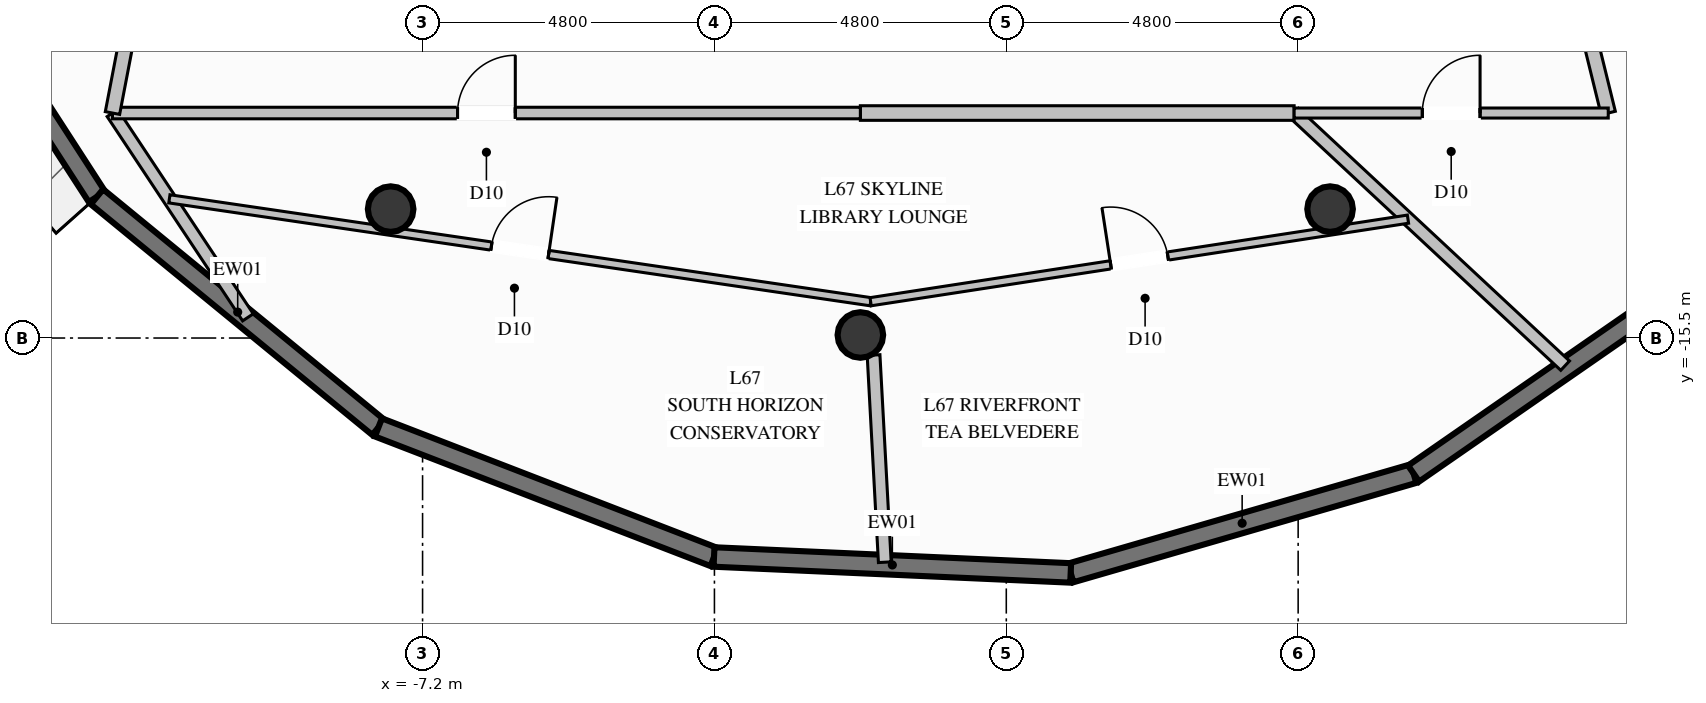
"""IFC4 building model, lengths in metres.
Left out: names, types, materials, properties, quantities, classifications, styles, units other than length and angle.
Written with IfcOpenShell. Run it as: python <this file> out.ifc"""

import sys

from ifc_helpers import new_model, si_unit, direction, frame, frame_2d, origin, origin_2d, place, context, subcontext, project, spatial, rectangle, circle, extrude, element, fill, save


model = new_model("IFC4")
c1 = context("Model", 3, precision=1e-05, world=origin(), true_north=direction((0.0, 1.0)))
c2 = subcontext(c1, "Body", "Model", "MODEL_VIEW")
j1 = project(units=[si_unit("LENGTHUNIT", "METRE"), si_unit("PLANEANGLEUNIT", "RADIAN")], contexts=[c1])
p1 = place(None, origin())
s1 = spatial("IfcSite", under=j1, at=p1, CompositionType="ELEMENT")
p2 = place(p1, origin())
s2 = spatial("IfcBuilding", under=s1, at=p2, CompositionType="ELEMENT")
p3 = place(p2, frame((0.0, 0.0, 258.2)))
s3 = spatial("IfcBuildingStorey", under=s2, at=p3, CompositionType="ELEMENT", Elevation=258.2)
for number, where, z_axis, x_axis in (
    (1, (-7.725, -13.38, 0.0), (0.0, 0.0, 1.0), (1.0, 0.0, 0.0)),
    (2, (0.0, -15.45, 0.0), (0.0, 0.0, 1.0), (1.0, 0.0, 0.0)),
    (3, (7.725, -13.38, 0.0), (0.0, 0.0, 1.0), (1.0, 0.0, 0.0)),
):
    element("IfcColumn", number, at=place(p3, frame(where, z_axis=z_axis, x_axis=x_axis)), inside=s3, PredefinedType="COLUMN", context=c2, shape_type="SweptSolid", body=[
        extrude(circle(Radius=0.375, at=origin_2d()), origin(), (0.0, 0.0, 1.0), 3.8),
    ])
p4 = place(p3, frame((9.099, -17.729, 0.0), z_axis=(0.0, 0.0, 1.0), x_axis=(-0.960502287474, -0.278272089432, 0.0)))
e4 = element("IfcWall", 4, at=p4, inside=s3, PredefinedType="SOLIDWALL", context=c2, shape_type="SweptSolid", body=[
    extrude(rectangle(XDim=5.872, YDim=0.32, at=frame_2d((2.936, 0.0))), origin(), (0.0, 0.0, 1.0), 3.57),
])
p5 = place(p3, frame((13.961, -14.36, 0.0), z_axis=(0.0, 0.0, 1.0), x_axis=(-0.821952888389, -0.569555483925, 0.0)))
e5 = element("IfcWall", 5, at=p5, inside=s3, PredefinedType="SOLIDWALL", context=c2, shape_type="SweptSolid", body=[
    extrude(rectangle(XDim=5.915, YDim=0.32, at=frame_2d((2.958, 0.0))), origin(), (0.0, 0.0, 1.0), 3.57),
])
p6 = place(p3, frame((-12.555, -13.177, 0.0), z_axis=(0.0, 0.0, 1.0), x_axis=(-0.543217830049, 0.839591799101, 0.0)))
e6 = element("IfcWall", 6, at=p6, inside=s3, PredefinedType="SOLIDWALL", context=c2, shape_type="SweptSolid", body=[
    extrude(rectangle(XDim=6.053, YDim=0.32, at=frame_2d((3.026, 0.0))), origin(), (0.0, 0.0, 1.0), 3.57),
])
p7 = place(p3, frame((-7.926, -16.97, 0.0), z_axis=(0.0, 0.0, 1.0), x_axis=(-0.773491773729, 0.633806339486, 0.0)))
e7 = element("IfcWall", 7, at=p7, inside=s3, PredefinedType="SOLIDWALL", context=c2, shape_type="SweptSolid", body=[
    extrude(rectangle(XDim=5.984, YDim=0.32, at=frame_2d((2.992, 0.0))), origin(), (0.0, 0.0, 1.0), 3.57),
])
p8 = place(p3, frame((-2.407, -19.101, 0.0), z_axis=(0.0, 0.0, 1.0), x_axis=(-0.932869372668, 0.360214843582, 0.0)))
e8 = element("IfcWall", 8, at=p8, inside=s3, PredefinedType="SOLIDWALL", context=c2, shape_type="SweptSolid", body=[
    extrude(rectangle(XDim=5.916, YDim=0.32, at=frame_2d((2.958, 0.0))), origin(), (0.0, 0.0, 1.0), 3.57),
])
p9 = place(p3, frame((3.459, -19.363, 0.0), z_axis=(0.0, 0.0, 1.0), x_axis=(-0.999004316421, 0.044613627649, 0.0)))
e9 = element("IfcWall", 9, at=p9, inside=s3, PredefinedType="SOLIDWALL", context=c2, shape_type="SweptSolid", body=[
    extrude(rectangle(XDim=5.872, YDim=0.32, at=frame_2d((2.936, 0.0))), origin(), (0.0, 0.0, 1.0), 3.57),
])
p10 = place(p3, frame((7.134, -11.8, 0.0), z_axis=(0.0, 0.0, 1.0), x_axis=(0.731533464102, -0.681805537451, 0.0)))
e10 = element("IfcWall", 10, at=p10, inside=s3, PredefinedType="PARTITIONING", context=c2, shape_type="SweptSolid", body=[
    extrude(rectangle(XDim=6.093, YDim=0.21, at=frame_2d((3.046, 0.0))), origin(), (0.0, 0.0, 1.0), 2.449),
])
p11 = place(p3, frame((-12.3, -11.8, 0.0), z_axis=(0.0, 0.0, 1.0), x_axis=(0.552658168023, -0.833408032909, 0.0)))
e11 = element("IfcWall", 11, at=p11, inside=s3, PredefinedType="PARTITIONING", context=c2, shape_type="SweptSolid", body=[
    extrude(rectangle(XDim=4.031, YDim=0.21, at=frame_2d((2.016, 0.0))), origin(), (0.0, 0.0, 1.0), 3.57),
])
p12 = place(p3, frame((0.0, -11.8, 0.0), z_axis=(0.0, 0.0, 1.0), x_axis=(1.0, 0.0, 0.0)))
e12 = element("IfcWall", 12, at=p12, inside=s3, PredefinedType="PARTITIONING", context=c2, shape_type="SweptSolid", body=[
    extrude(rectangle(XDim=7.134, YDim=0.24, at=frame_2d((3.567, 0.0))), origin(), (0.0, 0.0, 1.0), 3.57),
])
p13 = place(p3, frame((-12.3, -11.8, 0.0), z_axis=(0.0, 0.0, 1.0), x_axis=(1.0, 0.0, 0.0)))
e13 = element("IfcWall", 13, at=p13, inside=s3, PredefinedType="PARTITIONING", context=c2, shape_type="SweptSolid", body=[
    extrude(rectangle(XDim=12.3, YDim=0.19, at=frame_2d((6.15, 0.0))), origin(), (0.0, 0.0, 1.0), 3.57),
])
p14 = place(p13, frame((5.675, 0.0, 0.0)))
e14 = element("IfcOpeningElement", 14, at=p14, cuts=e13, PredefinedType="OPENING", context=c2, shape_type="SweptSolid", body=[
    extrude(rectangle(XDim=0.95, YDim=2.1, at=frame_2d((0.475, 1.05))), frame((0.0, 0.105, 0.0), z_axis=(0.0, -1.0, 0.0), x_axis=(1.0, 0.0, 0.0)), (0.0, 0.0, 1.0), 0.21),
])
p15 = place(p3, frame((-11.235, -6.25, 0.0), z_axis=(0.0, 0.0, 1.0), x_axis=(-0.18844199237, -0.982084321997, 0.0)))
e15 = element("IfcWall", 15, at=p15, inside=s3, PredefinedType="PARTITIONING", context=c2, shape_type="SweptSolid", body=[
    extrude(rectangle(XDim=5.651, YDim=0.24, at=frame_2d((2.826, 0.0))), origin(), (0.0, 0.0, 1.0), 3.57),
])
p16 = place(p15, frame((2.326, 0.0, 0.0)))
e16 = element("IfcOpeningElement", 16, at=p16, cuts=e15, PredefinedType="OPENING", context=c2, shape_type="SweptSolid", body=[
    extrude(rectangle(XDim=1.0, YDim=2.2, at=frame_2d((0.5, 1.1))), frame((0.0, 0.13, 0.0), z_axis=(0.0, -1.0, 0.0), x_axis=(1.0, 0.0, 0.0)), (0.0, 0.0, 1.0), 0.26),
])
p17 = place(p3, frame((0.217, -15.78, 0.0), z_axis=(0.0, 0.0, 1.0), x_axis=(0.054237497116, -0.998528063655, 0.0)))
e17 = element("IfcWall", 17, at=p17, inside=s3, PredefinedType="PARTITIONING", context=c2, shape_type="SweptSolid", body=[
    extrude(rectangle(XDim=3.412, YDim=0.21, at=frame_2d((1.706, 0.0))), origin(), (0.0, 0.0, 1.0), 2.449),
])
p18 = place(p3, frame((-11.364, -13.211, 0.0), z_axis=(0.0, 0.0, 1.0), x_axis=(0.989407054011, -0.145167770091, 0.0)))
e18 = element("IfcWall", 18, at=p18, inside=s3, PredefinedType="PARTITIONING", context=c2, shape_type="SweptSolid", body=[
    extrude(rectangle(XDim=11.656, YDim=0.135, at=frame_2d((5.828, 0.0))), origin(), (0.0, 0.0, 1.0), 3.137),
])
p19 = place(p18, frame((5.353, 0.0, 0.0)))
e19 = element("IfcOpeningElement", 19, at=p19, cuts=e18, PredefinedType="OPENING", context=c2, shape_type="SweptSolid", body=[
    extrude(rectangle(XDim=0.95, YDim=2.1, at=frame_2d((0.475, 1.05))), frame((0.0, 0.078, 0.0), z_axis=(0.0, -1.0, 0.0), x_axis=(1.0, 0.0, 0.0)), (0.0, 0.0, 1.0), 0.155),
])
p20 = place(p3, frame((0.169, -14.903, 0.0), z_axis=(0.0, 0.0, 1.0), x_axis=(0.988395361394, 0.151903290202, 0.0)))
e20 = element("IfcWall", 20, at=p20, inside=s3, PredefinedType="PARTITIONING", context=c2, shape_type="SweptSolid", body=[
    extrude(rectangle(XDim=8.941, YDim=0.135, at=frame_2d((4.47, 0.0))), origin(), (0.0, 0.0, 1.0), 3.137),
])
p21 = place(p20, frame((3.995, 0.0, 0.0)))
e21 = element("IfcOpeningElement", 21, at=p21, cuts=e20, PredefinedType="OPENING", context=c2, shape_type="SweptSolid", body=[
    extrude(rectangle(XDim=0.95, YDim=2.1, at=frame_2d((0.475, 1.05))), frame((0.0, 0.078, 0.0), z_axis=(0.0, -1.0, 0.0), x_axis=(1.0, 0.0, 0.0)), (0.0, 0.0, 1.0), 0.155),
])
p22 = place(p3, frame((12.3, -11.8, 0.0), z_axis=(0.0, 0.0, 1.0), x_axis=(-0.238825099749, 0.971062599285, 0.0)))
e22 = element("IfcWall", 22, at=p22, inside=s3, PredefinedType="PARTITIONING", context=c2, shape_type="SweptSolid", body=[
    extrude(rectangle(XDim=5.715, YDim=0.24, at=frame_2d((2.858, 0.0))), origin(), (0.0, 0.0, 1.0), 3.57),
])
p23 = place(p3, frame((7.134, -11.8, 0.0), z_axis=(0.0, 0.0, 1.0), x_axis=(1.0, 0.0, 0.0)))
e23 = element("IfcWall", 23, at=p23, inside=s3, PredefinedType="PARTITIONING", context=c2, shape_type="SweptSolid", body=[
    extrude(rectangle(XDim=5.166, YDim=0.165, at=frame_2d((2.583, 0.0))), origin(), (0.0, 0.0, 1.0), 3.57),
])
p24 = place(p23, frame((2.108, 0.0, 0.0)))
e24 = element("IfcOpeningElement", 24, at=p24, cuts=e23, PredefinedType="OPENING", context=c2, shape_type="SweptSolid", body=[
    extrude(rectangle(XDim=0.95, YDim=2.1, at=frame_2d((0.475, 1.05))), frame((0.0, 0.093, 0.0), z_axis=(0.0, -1.0, 0.0), x_axis=(1.0, 0.0, 0.0)), (0.0, 0.0, 1.0), 0.185),
])
p25 = place(p14, origin())
e25 = element("IfcDoor", 25, at=p25, inside=s3, OperationType="SINGLE_SWING_RIGHT", PredefinedType="DOOR", context=c2, shape_type="SweptSolid", body=[
    extrude(rectangle(XDim=0.95, YDim=2.1, at=frame_2d((0.475, 1.05))), frame((0.0, 0.025, 0.0), z_axis=(0.0, -1.0, 0.0), x_axis=(1.0, 0.0, 0.0)), (0.0, 0.0, 1.0), 0.05),
])
fill(e14, e25)
p26 = place(p19, origin())
e26 = element("IfcDoor", 26, at=p26, inside=s3, OperationType="SINGLE_SWING_RIGHT", PredefinedType="DOOR", context=c2, shape_type="SweptSolid", body=[
    extrude(rectangle(XDim=0.95, YDim=2.1, at=frame_2d((0.475, 1.05))), frame((0.0, 0.025, 0.0), z_axis=(0.0, -1.0, 0.0), x_axis=(1.0, 0.0, 0.0)), (0.0, 0.0, 1.0), 0.05),
])
fill(e19, e26)
p27 = place(p21, origin())
e27 = element("IfcDoor", 27, at=p27, inside=s3, OperationType="SINGLE_SWING_LEFT", PredefinedType="DOOR", context=c2, shape_type="SweptSolid", body=[
    extrude(rectangle(XDim=0.95, YDim=2.1, at=frame_2d((0.475, 1.05))), frame((0.0, 0.025, 0.0), z_axis=(0.0, -1.0, 0.0), x_axis=(1.0, 0.0, 0.0)), (0.0, 0.0, 1.0), 0.05),
])
fill(e21, e27)
p28 = place(p24, origin())
e28 = element("IfcDoor", 28, at=p28, inside=s3, OperationType="SINGLE_SWING_RIGHT", PredefinedType="DOOR", context=c2, shape_type="SweptSolid", body=[
    extrude(rectangle(XDim=0.95, YDim=2.1, at=frame_2d((0.475, 1.05))), frame((0.0, 0.025, 0.0), z_axis=(0.0, -1.0, 0.0), x_axis=(1.0, 0.0, 0.0)), (0.0, 0.0, 1.0), 0.05),
])
fill(e24, e28)
save(model, sys.argv[1])
